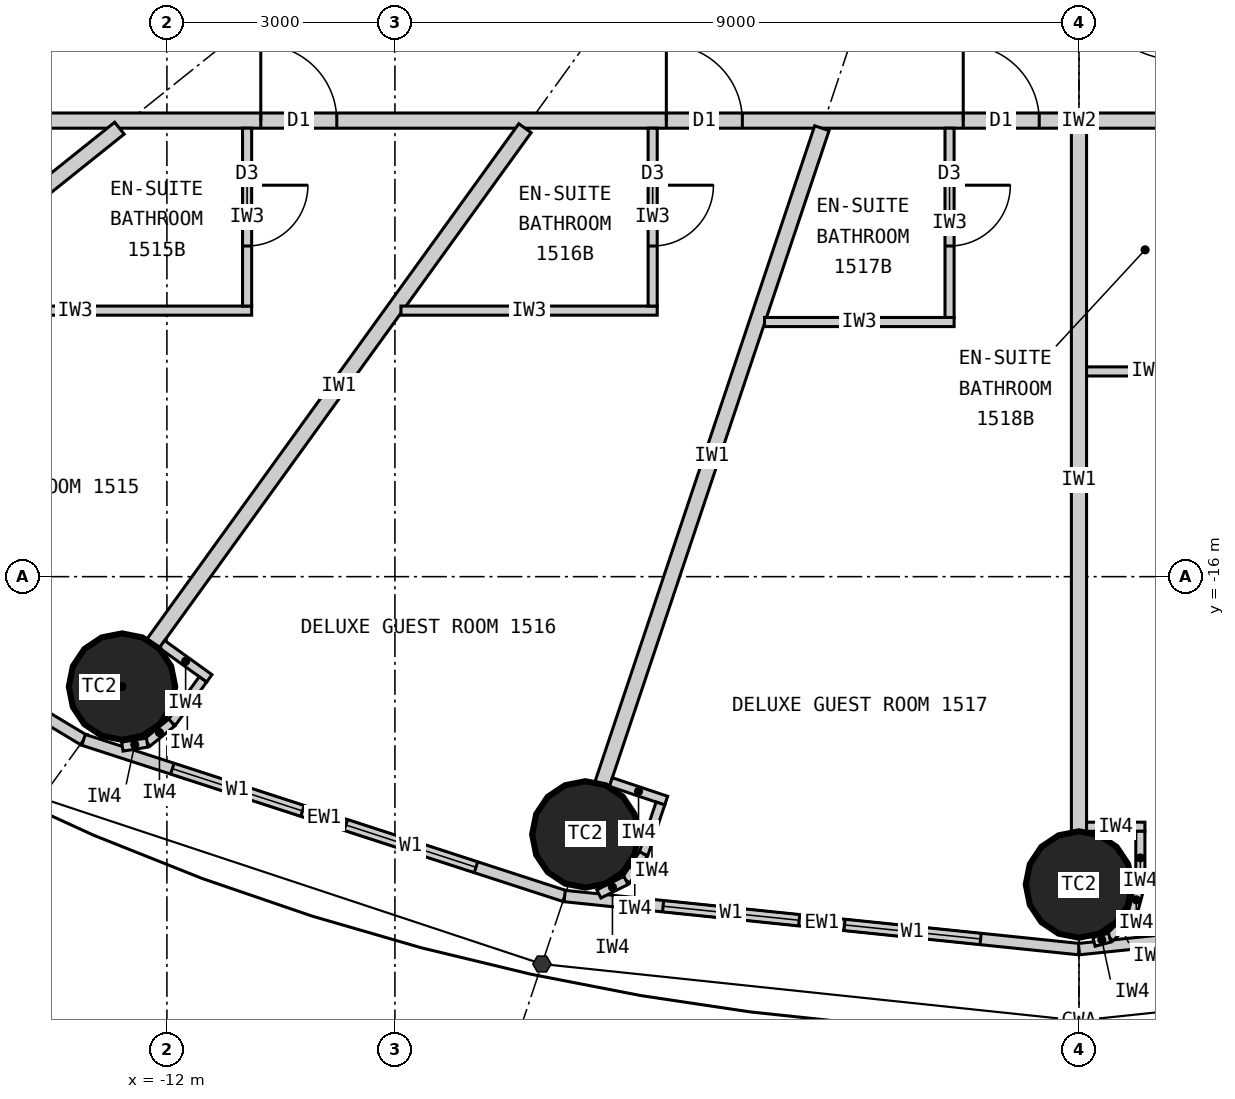
"""IFC4 building model, lengths in metres.
Left out: names, types, materials, properties, quantities, classifications, styles, units other than length and angle.
Written with IfcOpenShell. Run it as: python <this file> out.ifc"""

import sys

from ifc_helpers import new_model, si_unit, direction, frame, frame_2d, origin, origin_2d, place, context, subcontext, project, spatial, rectangle, circle, extrude, element, fill, save


model = new_model("IFC4")
c1 = context("Model", 3, precision=1e-05, world=origin(), true_north=direction((0.0, 1.0)))
c2 = subcontext(c1, "Body", "Model", "MODEL_VIEW")
j1 = project(units=[si_unit("LENGTHUNIT", "METRE"), si_unit("PLANEANGLEUNIT", "RADIAN")], contexts=[c1])
p1 = place(None, origin())
s1 = spatial("IfcSite", under=j1, at=p1, CompositionType="ELEMENT")
p2 = place(p1, origin())
s2 = spatial("IfcBuilding", under=s1, at=p2, CompositionType="ELEMENT")
p3 = place(p2, frame((0.0, 0.0, 63.9)))
s3 = spatial("IfcBuildingStorey", under=s2, at=p3, CompositionType="ELEMENT", Elevation=63.9)
for number, where, z_axis, x_axis in (
    (1, (-12.591, -17.447, 0.0), (0.0, 0.0, 1.0), (1.0, 0.0, 0.0)),
    (2, (-6.495, -19.391, 0.0), (0.0, 0.0, 1.0), (1.0, 0.0, 0.0)),
    (3, (0.0, -20.05, 0.0), (0.0, 0.0, 1.0), (1.0, 0.0, 0.0)),
):
    element("IfcColumn", number, at=place(p3, frame(where, z_axis=z_axis, x_axis=x_axis)), inside=s3, PredefinedType="COLUMN", context=c2, shape_type="SweptSolid", body=[
        extrude(circle(Radius=0.7, at=origin_2d()), origin(), (0.0, 0.0, 1.0), 3.3),
    ])
p4 = place(p3, frame((-18.57, -14.856, 0.0), z_axis=(0.0, 0.0, 1.0), x_axis=(0.856983180864, -0.515344377787, 0.0)))
e4 = element("IfcWall", 4, at=p4, inside=s3, PredefinedType="ELEMENTEDWALL", context=c2, shape_type="SweptSolid", body=[
    extrude(rectangle(XDim=6.386, YDim=0.15, at=frame_2d((3.193, 0.0))), origin(), (0.0, 0.0, 1.0), 3.12),
])
p5 = place(p4, frame((1.093, 0.0, 0.9)))
e5 = element("IfcOpeningElement", 5, at=p5, cuts=e4, PredefinedType="OPENING", context=c2, shape_type="SweptSolid", body=[
    extrude(rectangle(XDim=1.8, YDim=1.9, at=frame_2d((0.9, 0.95))), frame((0.0, 0.085, 0.0), z_axis=(0.0, -1.0, 0.0), x_axis=(1.0, 0.0, 0.0)), (0.0, 0.0, 1.0), 0.17),
])
p6 = place(p4, frame((3.493, 0.0, 0.9)))
e6 = element("IfcOpeningElement", 6, at=p6, cuts=e4, PredefinedType="OPENING", context=c2, shape_type="SweptSolid", body=[
    extrude(rectangle(XDim=1.8, YDim=1.9, at=frame_2d((0.9, 0.95))), frame((0.0, 0.085, 0.0), z_axis=(0.0, -1.0, 0.0), x_axis=(1.0, 0.0, 0.0)), (0.0, 0.0, 1.0), 0.17),
])
p7 = place(p3, frame((-13.096, -18.147, 0.0), z_axis=(0.0, 0.0, 1.0), x_axis=(0.951137534625, -0.308767534285, 0.0)))
e7 = element("IfcWall", 7, at=p7, inside=s3, PredefinedType="ELEMENTEDWALL", context=c2, shape_type="SweptSolid", body=[
    extrude(rectangle(XDim=6.655, YDim=0.15, at=frame_2d((3.328, 0.0))), origin(), (0.0, 0.0, 1.0), 3.12),
])
p8 = place(p7, frame((1.228, 0.0, 0.9)))
e8 = element("IfcOpeningElement", 8, at=p8, cuts=e7, PredefinedType="OPENING", context=c2, shape_type="SweptSolid", body=[
    extrude(rectangle(XDim=1.8, YDim=1.9, at=frame_2d((0.9, 0.95))), frame((0.0, 0.085, 0.0), z_axis=(0.0, -1.0, 0.0), x_axis=(1.0, 0.0, 0.0)), (0.0, 0.0, 1.0), 0.17),
])
p9 = place(p7, frame((3.628, 0.0, 0.9)))
e9 = element("IfcOpeningElement", 9, at=p9, cuts=e7, PredefinedType="OPENING", context=c2, shape_type="SweptSolid", body=[
    extrude(rectangle(XDim=1.8, YDim=1.9, at=frame_2d((0.9, 0.95))), frame((0.0, 0.085, 0.0), z_axis=(0.0, -1.0, 0.0), x_axis=(1.0, 0.0, 0.0)), (0.0, 0.0, 1.0), 0.17),
])
p10 = place(p3, frame((-6.766, -20.202, 0.0), z_axis=(0.0, 0.0, 1.0), x_axis=(0.994721394369, -0.102612609291, 0.0)))
e10 = element("IfcWall", 10, at=p10, inside=s3, PredefinedType="ELEMENTEDWALL", context=c2, shape_type="SweptSolid", body=[
    extrude(rectangle(XDim=6.802, YDim=0.15, at=frame_2d((3.401, 0.0))), origin(), (0.0, 0.0, 1.0), 3.12),
])
p11 = place(p10, frame((1.301, 0.0, 0.9)))
e11 = element("IfcOpeningElement", 11, at=p11, cuts=e10, PredefinedType="OPENING", context=c2, shape_type="SweptSolid", body=[
    extrude(rectangle(XDim=1.8, YDim=1.9, at=frame_2d((0.9, 0.95))), frame((0.0, 0.085, 0.0), z_axis=(0.0, -1.0, 0.0), x_axis=(1.0, 0.0, 0.0)), (0.0, 0.0, 1.0), 0.17),
])
p12 = place(p10, frame((3.701, 0.0, 0.9)))
e12 = element("IfcOpeningElement", 12, at=p12, cuts=e10, PredefinedType="OPENING", context=c2, shape_type="SweptSolid", body=[
    extrude(rectangle(XDim=1.8, YDim=1.9, at=frame_2d((0.9, 0.95))), frame((0.0, 0.085, 0.0), z_axis=(0.0, -1.0, 0.0), x_axis=(1.0, 0.0, 0.0)), (0.0, 0.0, 1.0), 0.17),
])
p13 = place(p3, frame((0.0, -20.9, 0.0), z_axis=(0.0, 0.0, 1.0), x_axis=(0.994721394369, 0.102612609291, 0.0)))
e13 = element("IfcWall", 13, at=p13, inside=s3, PredefinedType="ELEMENTEDWALL", context=c2, shape_type="SweptSolid", body=[
    extrude(rectangle(XDim=6.802, YDim=0.15, at=frame_2d((3.401, 0.0))), origin(), (0.0, 0.0, 1.0), 3.12),
])
p14 = place(p13, frame((1.301, 0.0, 0.9)))
e14 = element("IfcOpeningElement", 14, at=p14, cuts=e13, PredefinedType="OPENING", context=c2, shape_type="SweptSolid", body=[
    extrude(rectangle(XDim=1.8, YDim=1.9, at=frame_2d((0.9, 0.95))), frame((0.0, 0.085, 0.0), z_axis=(0.0, -1.0, 0.0), x_axis=(1.0, 0.0, 0.0)), (0.0, 0.0, 1.0), 0.17),
])
p15 = place(p13, frame((3.701, 0.0, 0.9)))
e15 = element("IfcOpeningElement", 15, at=p15, cuts=e13, PredefinedType="OPENING", context=c2, shape_type="SweptSolid", body=[
    extrude(rectangle(XDim=1.8, YDim=1.9, at=frame_2d((0.9, 0.95))), frame((0.0, 0.085, 0.0), z_axis=(0.0, -1.0, 0.0), x_axis=(1.0, 0.0, 0.0)), (0.0, 0.0, 1.0), 0.17),
])
p16 = place(p3, frame((14.1, -10.0, 0.0), z_axis=(0.0, 0.0, 1.0), x_axis=(-1.0, 0.0, 0.0)))
e16 = element("IfcWall", 16, at=p16, inside=s3, PredefinedType="PARTITIONING", context=c2, shape_type="SweptSolid", body=[
    extrude(rectangle(XDim=28.2, YDim=0.2, at=frame_2d((14.1, 0.0))), origin(), (0.0, 0.0, 1.0), 3.12),
])
p17 = place(p16, frame((23.865, 0.0, 0.0)))
e17 = element("IfcOpeningElement", 17, at=p17, cuts=e16, PredefinedType="OPENING", context=c2, shape_type="SweptSolid", body=[
    extrude(rectangle(XDim=1.0, YDim=2.2, at=frame_2d((0.5, 1.1))), frame((0.0, 0.11, 0.0), z_axis=(0.0, -1.0, 0.0), x_axis=(1.0, 0.0, 0.0)), (0.0, 0.0, 1.0), 0.22),
])
p18 = place(p16, frame((18.529, 0.0, 0.0)))
e18 = element("IfcOpeningElement", 18, at=p18, cuts=e16, PredefinedType="OPENING", context=c2, shape_type="SweptSolid", body=[
    extrude(rectangle(XDim=1.0, YDim=2.2, at=frame_2d((0.5, 1.1))), frame((0.0, 0.11, 0.0), z_axis=(0.0, -1.0, 0.0), x_axis=(1.0, 0.0, 0.0)), (0.0, 0.0, 1.0), 0.22),
])
p19 = place(p16, frame((14.623, 0.0, 0.0)))
e19 = element("IfcOpeningElement", 19, at=p19, cuts=e16, PredefinedType="OPENING", context=c2, shape_type="SweptSolid", body=[
    extrude(rectangle(XDim=1.0, YDim=2.2, at=frame_2d((0.5, 1.1))), frame((0.0, 0.11, 0.0), z_axis=(0.0, -1.0, 0.0), x_axis=(1.0, 0.0, 0.0)), (0.0, 0.0, 1.0), 0.22),
])
p20 = place(p16, frame((11.24, 0.0, 0.0)))
e20 = element("IfcOpeningElement", 20, at=p20, cuts=e16, PredefinedType="OPENING", context=c2, shape_type="SweptSolid", body=[
    extrude(rectangle(XDim=1.0, YDim=2.2, at=frame_2d((0.5, 1.1))), frame((0.0, 0.11, 0.0), z_axis=(0.0, -1.0, 0.0), x_axis=(1.0, 0.0, 0.0)), (0.0, 0.0, 1.0), 0.22),
])
p21 = place(p16, frame((8.671, 0.0, 0.0)))
e21 = element("IfcOpeningElement", 21, at=p21, cuts=e16, PredefinedType="OPENING", context=c2, shape_type="SweptSolid", body=[
    extrude(rectangle(XDim=1.0, YDim=2.2, at=frame_2d((0.5, 1.1))), frame((0.0, 0.11, 0.0), z_axis=(0.0, -1.0, 0.0), x_axis=(1.0, 0.0, 0.0)), (0.0, 0.0, 1.0), 0.22),
])
p22 = place(p16, frame((2.801, 0.0, 0.0)))
e22 = element("IfcOpeningElement", 22, at=p22, cuts=e16, PredefinedType="OPENING", context=c2, shape_type="SweptSolid", body=[
    extrude(rectangle(XDim=1.0, YDim=2.2, at=frame_2d((0.5, 1.1))), frame((0.0, 0.11, 0.0), z_axis=(0.0, -1.0, 0.0), x_axis=(1.0, 0.0, 0.0)), (0.0, 0.0, 1.0), 0.22),
])
p23 = place(p3, frame((-12.625, -10.1, 0.0), z_axis=(0.0, 0.0, 1.0), x_axis=(-0.780892451574, -0.624665493744, 0.0)))
e23 = element("IfcWall", 23, at=p23, inside=s3, PredefinedType="PARTITIONING", context=c2, shape_type="SweptSolid", body=[
    extrude(rectangle(XDim=6.045, YDim=0.2, at=frame_2d((3.022, 0.0))), origin(), (0.0, 0.0, 1.0), 2.32),
])
p24 = place(p3, frame((-7.289, -10.1, 0.0), z_axis=(0.0, 0.0, 1.0), x_axis=(-0.585198353053, -0.810890182197, 0.0)))
e24 = element("IfcWall", 24, at=p24, inside=s3, PredefinedType="PARTITIONING", context=c2, shape_type="SweptSolid", body=[
    extrude(rectangle(XDim=8.36, YDim=0.2, at=frame_2d((4.18, 0.0))), origin(), (0.0, 0.0, 1.0), 2.32),
])
p25 = place(p3, frame((-3.383, -10.1, 0.0), z_axis=(0.0, 0.0, 1.0), x_axis=(-0.31759592231, -0.948226149256, 0.0)))
e25 = element("IfcWall", 25, at=p25, inside=s3, PredefinedType="PARTITIONING", context=c2, shape_type="SweptSolid", body=[
    extrude(rectangle(XDim=9.098, YDim=0.2, at=frame_2d((4.549, 0.0))), origin(), (0.0, 0.0, 1.0), 2.32),
])
p26 = place(p3, frame((0.0, -10.1, 0.0), z_axis=(0.0, 0.0, 1.0), x_axis=(0.0, -1.0, 0.0)))
e26 = element("IfcWall", 26, at=p26, inside=s3, PredefinedType="PARTITIONING", context=c2, shape_type="SweptSolid", body=[
    extrude(rectangle(XDim=9.25, YDim=0.2, at=frame_2d((4.625, 0.0))), origin(), (0.0, 0.0, 1.0), 2.32),
])
p27 = place(p3, frame((-15.525, -12.5, 0.0), z_axis=(0.0, 0.0, 1.0), x_axis=(1.0, 0.0, 0.0)))
e27 = element("IfcWall", 27, at=p27, inside=s3, PredefinedType="PARTITIONING", context=c2, shape_type="SweptSolid", body=[
    extrude(rectangle(XDim=4.64, YDim=0.12, at=frame_2d((2.32, 0.0))), origin(), (0.0, 0.0, 1.0), 3.12),
])
p28 = place(p3, frame((-10.945, -10.1, 0.0), z_axis=(0.0, 0.0, 1.0), x_axis=(0.0, -1.0, 0.0)))
e28 = element("IfcWall", 28, at=p28, inside=s3, PredefinedType="PARTITIONING", context=c2, shape_type="SweptSolid", body=[
    extrude(rectangle(XDim=2.34, YDim=0.12, at=frame_2d((1.17, 0.0))), origin(), (0.0, 0.0, 1.0), 3.12),
])
p29 = place(p28, frame((0.75, 0.0, 0.0)))
e29 = element("IfcOpeningElement", 29, at=p29, cuts=e28, PredefinedType="OPENING", context=c2, shape_type="SweptSolid", body=[
    extrude(rectangle(XDim=0.8, YDim=2.1, at=frame_2d((0.4, 1.05))), frame((0.0, 0.07, 0.0), z_axis=(0.0, -1.0, 0.0), x_axis=(1.0, 0.0, 0.0)), (0.0, 0.0, 1.0), 0.14),
])
p30 = place(p3, frame((-8.921, -12.5, 0.0), z_axis=(0.0, 0.0, 1.0), x_axis=(1.0, 0.0, 0.0)))
e30 = element("IfcWall", 30, at=p30, inside=s3, PredefinedType="PARTITIONING", context=c2, shape_type="SweptSolid", body=[
    extrude(rectangle(XDim=3.372, YDim=0.12, at=frame_2d((1.686, 0.0))), origin(), (0.0, 0.0, 1.0), 3.12),
])
p31 = place(p3, frame((-5.609, -10.1, 0.0), z_axis=(0.0, 0.0, 1.0), x_axis=(0.0, -1.0, 0.0)))
e31 = element("IfcWall", 31, at=p31, inside=s3, PredefinedType="PARTITIONING", context=c2, shape_type="SweptSolid", body=[
    extrude(rectangle(XDim=2.34, YDim=0.12, at=frame_2d((1.17, 0.0))), origin(), (0.0, 0.0, 1.0), 3.12),
])
p32 = place(p31, frame((0.75, 0.0, 0.0)))
e32 = element("IfcOpeningElement", 32, at=p32, cuts=e31, PredefinedType="OPENING", context=c2, shape_type="SweptSolid", body=[
    extrude(rectangle(XDim=0.8, YDim=2.1, at=frame_2d((0.4, 1.05))), frame((0.0, 0.07, 0.0), z_axis=(0.0, -1.0, 0.0), x_axis=(1.0, 0.0, 0.0)), (0.0, 0.0, 1.0), 0.14),
])
p33 = place(p3, frame((-4.137, -12.65, 0.0), z_axis=(0.0, 0.0, 1.0), x_axis=(1.0, 0.0, 0.0)))
e33 = element("IfcWall", 33, at=p33, inside=s3, PredefinedType="PARTITIONING", context=c2, shape_type="SweptSolid", body=[
    extrude(rectangle(XDim=2.494, YDim=0.12, at=frame_2d((1.247, 0.0))), origin(), (0.0, 0.0, 1.0), 3.12),
])
p34 = place(p3, frame((-1.703, -10.1, 0.0), z_axis=(0.0, 0.0, 1.0), x_axis=(0.0, -1.0, 0.0)))
e34 = element("IfcWall", 34, at=p34, inside=s3, PredefinedType="PARTITIONING", context=c2, shape_type="SweptSolid", body=[
    extrude(rectangle(XDim=2.49, YDim=0.12, at=frame_2d((1.245, 0.0))), origin(), (0.0, 0.0, 1.0), 3.12),
])
p35 = place(p34, frame((0.75, 0.0, 0.0)))
e35 = element("IfcOpeningElement", 35, at=p35, cuts=e34, PredefinedType="OPENING", context=c2, shape_type="SweptSolid", body=[
    extrude(rectangle(XDim=0.8, YDim=2.1, at=frame_2d((0.4, 1.05))), frame((0.0, 0.07, 0.0), z_axis=(0.0, -1.0, 0.0), x_axis=(1.0, 0.0, 0.0)), (0.0, 0.0, 1.0), 0.14),
])
p36 = place(p3, frame((0.1, -13.3, 0.0), z_axis=(0.0, 0.0, 1.0), x_axis=(1.0, 0.0, 0.0)))
e36 = element("IfcWall", 36, at=p36, inside=s3, PredefinedType="PARTITIONING", context=c2, shape_type="SweptSolid", body=[
    extrude(rectangle(XDim=1.64, YDim=0.12, at=frame_2d((0.82, 0.0))), origin(), (0.0, 0.0, 1.0), 3.12),
])
p37 = place(p3, frame((-12.065, -16.889, 0.0), z_axis=(0.0, 0.0, 1.0), x_axis=(0.810821798253, -0.585293098778, 0.0)))
e37 = element("IfcWall", 37, at=p37, inside=s3, PredefinedType="PARTITIONING", context=c2, shape_type="SweptSolid", body=[
    extrude(rectangle(XDim=0.768, YDim=0.12, at=frame_2d((0.384, 0.0))), origin(), (0.0, 0.0, 1.0), 3.12),
])
p38 = place(p3, frame((-11.526, -17.351, 0.0), z_axis=(0.0, 0.0, 1.0), x_axis=(-0.585223113993, -0.810872312296, 0.0)))
e38 = element("IfcWall", 38, at=p38, inside=s3, PredefinedType="PARTITIONING", context=c2, shape_type="SweptSolid", body=[
    extrude(rectangle(XDim=0.7, YDim=0.12, at=frame_2d((0.35, 0.0))), origin(), (0.0, 0.0, 1.0), 3.12),
])
p39 = place(p3, frame((-11.936, -17.919, 0.0), z_axis=(0.0, 0.0, 1.0), x_axis=(-0.775023088441, -0.631932917629, 0.0)))
e39 = element("IfcWall", 39, at=p39, inside=s3, PredefinedType="PARTITIONING", context=c2, shape_type="SweptSolid", body=[
    extrude(rectangle(XDim=0.418, YDim=0.12, at=frame_2d((0.209, 0.0))), origin(), (0.0, 0.0, 1.0), 3.12),
])
p40 = place(p3, frame((-12.26, -18.183, 0.0), z_axis=(0.0, 0.0, 1.0), x_axis=(-0.987218661664, -0.159371622511, 0.0)))
e40 = element("IfcWall", 40, at=p40, inside=s3, PredefinedType="PARTITIONING", context=c2, shape_type="SweptSolid", body=[
    extrude(rectangle(XDim=0.331, YDim=0.12, at=frame_2d((0.166, 0.0))), origin(), (0.0, 0.0, 1.0), 3.12),
])
p41 = place(p3, frame((-6.159, -18.702, 0.0), z_axis=(0.0, 0.0, 1.0), x_axis=(0.948173154049, -0.31775410295, 0.0)))
e41 = element("IfcWall", 41, at=p41, inside=s3, PredefinedType="PARTITIONING", context=c2, shape_type="SweptSolid", body=[
    extrude(rectangle(XDim=0.768, YDim=0.12, at=frame_2d((0.384, 0.0))), origin(), (0.0, 0.0, 1.0), 3.12),
])
p42 = place(p3, frame((-5.507, -18.984, 0.0), z_axis=(0.0, 0.0, 1.0), x_axis=(-0.317692050622, -0.948193946918, 0.0)))
e42 = element("IfcWall", 42, at=p42, inside=s3, PredefinedType="PARTITIONING", context=c2, shape_type="SweptSolid", body=[
    extrude(rectangle(XDim=0.7, YDim=0.12, at=frame_2d((0.35, 0.0))), origin(), (0.0, 0.0, 1.0), 3.12),
])
p43 = place(p3, frame((-5.729, -19.648, 0.0), z_axis=(0.0, 0.0, 1.0), x_axis=(-0.552135764955, -0.833754218615, 0.0)))
e43 = element("IfcWall", 43, at=p43, inside=s3, PredefinedType="PARTITIONING", context=c2, shape_type="SweptSolid", body=[
    extrude(rectangle(XDim=0.418, YDim=0.12, at=frame_2d((0.209, 0.0))), origin(), (0.0, 0.0, 1.0), 3.12),
])
p44 = place(p3, frame((-5.96, -19.996, 0.0), z_axis=(0.0, 0.0, 1.0), x_axis=(-0.895160725913, -0.445743507842, 0.0)))
e44 = element("IfcWall", 44, at=p44, inside=s3, PredefinedType="PARTITIONING", context=c2, shape_type="SweptSolid", body=[
    extrude(rectangle(XDim=0.399, YDim=0.12, at=frame_2d((0.199, 0.0))), origin(), (0.0, 0.0, 1.0), 3.12),
])
p45 = place(p3, frame((0.1, -19.29, 0.0), z_axis=(0.0, 0.0, 1.0), x_axis=(1.0, 0.0, 0.0)))
e45 = element("IfcWall", 45, at=p45, inside=s3, PredefinedType="PARTITIONING", context=c2, shape_type="SweptSolid", body=[
    extrude(rectangle(XDim=0.767, YDim=0.12, at=frame_2d((0.384, 0.0))), origin(), (0.0, 0.0, 1.0), 3.12),
])
p46 = place(p3, frame((0.808, -19.35, 0.0), z_axis=(0.0, 0.0, 1.0), x_axis=(0.0, -1.0, 0.0)))
e46 = element("IfcWall", 46, at=p46, inside=s3, PredefinedType="PARTITIONING", context=c2, shape_type="SweptSolid", body=[
    extrude(rectangle(XDim=0.7, YDim=0.12, at=frame_2d((0.35, 0.0))), origin(), (0.0, 0.0, 1.0), 3.12),
])
p47 = place(p3, frame((0.808, -20.05, 0.0), z_axis=(0.0, 0.0, 1.0), x_axis=(-0.2592614205, -0.965807183573, 0.0)))
e47 = element("IfcWall", 47, at=p47, inside=s3, PredefinedType="PARTITIONING", context=c2, shape_type="SweptSolid", body=[
    extrude(rectangle(XDim=0.418, YDim=0.12, at=frame_2d((0.209, 0.0))), origin(), (0.0, 0.0, 1.0), 3.12),
])
p48 = place(p3, frame((0.699, -20.454, 0.0), z_axis=(0.0, 0.0, 1.0), x_axis=(-0.707106781187, -0.707106781187, 0.0)))
e48 = element("IfcWall", 48, at=p48, inside=s3, PredefinedType="PARTITIONING", context=c2, shape_type="SweptSolid", body=[
    extrude(rectangle(XDim=0.418, YDim=0.12, at=frame_2d((0.209, 0.0))), origin(), (0.0, 0.0, 1.0), 3.12),
])
p49 = place(p3, frame((0.404, -20.749, 0.0), z_axis=(0.0, 0.0, 1.0), x_axis=(-0.965759066438, -0.25944060128, 0.0)))
e49 = element("IfcWall", 49, at=p49, inside=s3, PredefinedType="PARTITIONING", context=c2, shape_type="SweptSolid", body=[
    extrude(rectangle(XDim=0.214, YDim=0.12, at=frame_2d((0.107, 0.0))), origin(), (0.0, 0.0, 1.0), 3.12),
])
p50 = place(p8, origin())
e50 = element("IfcWindow", 50, at=p50, inside=s3, PartitioningType="SINGLE_PANEL", PredefinedType="WINDOW", context=c2, shape_type="SweptSolid", body=[
    extrude(rectangle(XDim=1.8, YDim=1.9, at=frame_2d((0.9, 0.95))), frame((0.0, 0.03, 0.0), z_axis=(0.0, -1.0, 0.0), x_axis=(1.0, 0.0, 0.0)), (0.0, 0.0, 1.0), 0.06),
])
fill(e8, e50)
p51 = place(p9, origin())
e51 = element("IfcWindow", 51, at=p51, inside=s3, PartitioningType="SINGLE_PANEL", PredefinedType="WINDOW", context=c2, shape_type="SweptSolid", body=[
    extrude(rectangle(XDim=1.8, YDim=1.9, at=frame_2d((0.9, 0.95))), frame((0.0, 0.03, 0.0), z_axis=(0.0, -1.0, 0.0), x_axis=(1.0, 0.0, 0.0)), (0.0, 0.0, 1.0), 0.06),
])
fill(e9, e51)
p52 = place(p11, origin())
e52 = element("IfcWindow", 52, at=p52, inside=s3, PartitioningType="SINGLE_PANEL", PredefinedType="WINDOW", context=c2, shape_type="SweptSolid", body=[
    extrude(rectangle(XDim=1.8, YDim=1.9, at=frame_2d((0.9, 0.95))), frame((0.0, 0.03, 0.0), z_axis=(0.0, -1.0, 0.0), x_axis=(1.0, 0.0, 0.0)), (0.0, 0.0, 1.0), 0.06),
])
fill(e11, e52)
p53 = place(p12, origin())
e53 = element("IfcWindow", 53, at=p53, inside=s3, PartitioningType="SINGLE_PANEL", PredefinedType="WINDOW", context=c2, shape_type="SweptSolid", body=[
    extrude(rectangle(XDim=1.8, YDim=1.9, at=frame_2d((0.9, 0.95))), frame((0.0, 0.03, 0.0), z_axis=(0.0, -1.0, 0.0), x_axis=(1.0, 0.0, 0.0)), (0.0, 0.0, 1.0), 0.06),
])
fill(e12, e53)
p54 = place(p29, origin())
e54 = element("IfcDoor", 54, at=p54, inside=s3, OperationType="SINGLE_SWING_LEFT", PredefinedType="DOOR", context=c2, shape_type="SweptSolid", body=[
    extrude(rectangle(XDim=0.8, YDim=2.1, at=frame_2d((0.4, 1.05))), frame((0.0, 0.025, 0.0), z_axis=(0.0, -1.0, 0.0), x_axis=(1.0, 0.0, 0.0)), (0.0, 0.0, 1.0), 0.05),
])
fill(e29, e54)
p55 = place(p17, origin())
e55 = element("IfcDoor", 55, at=p55, inside=s3, OperationType="SINGLE_SWING_RIGHT", PredefinedType="DOOR", context=c2, shape_type="SweptSolid", body=[
    extrude(rectangle(XDim=1.0, YDim=2.2, at=frame_2d((0.5, 1.1))), frame((0.0, 0.025, 0.0), z_axis=(0.0, -1.0, 0.0), x_axis=(1.0, 0.0, 0.0)), (0.0, 0.0, 1.0), 0.05),
])
fill(e17, e55)
p56 = place(p32, origin())
e56 = element("IfcDoor", 56, at=p56, inside=s3, OperationType="SINGLE_SWING_LEFT", PredefinedType="DOOR", context=c2, shape_type="SweptSolid", body=[
    extrude(rectangle(XDim=0.8, YDim=2.1, at=frame_2d((0.4, 1.05))), frame((0.0, 0.025, 0.0), z_axis=(0.0, -1.0, 0.0), x_axis=(1.0, 0.0, 0.0)), (0.0, 0.0, 1.0), 0.05),
])
fill(e32, e56)
p57 = place(p18, origin())
e57 = element("IfcDoor", 57, at=p57, inside=s3, OperationType="SINGLE_SWING_RIGHT", PredefinedType="DOOR", context=c2, shape_type="SweptSolid", body=[
    extrude(rectangle(XDim=1.0, YDim=2.2, at=frame_2d((0.5, 1.1))), frame((0.0, 0.025, 0.0), z_axis=(0.0, -1.0, 0.0), x_axis=(1.0, 0.0, 0.0)), (0.0, 0.0, 1.0), 0.05),
])
fill(e18, e57)
p58 = place(p35, origin())
e58 = element("IfcDoor", 58, at=p58, inside=s3, OperationType="SINGLE_SWING_LEFT", PredefinedType="DOOR", context=c2, shape_type="SweptSolid", body=[
    extrude(rectangle(XDim=0.8, YDim=2.1, at=frame_2d((0.4, 1.05))), frame((0.0, 0.025, 0.0), z_axis=(0.0, -1.0, 0.0), x_axis=(1.0, 0.0, 0.0)), (0.0, 0.0, 1.0), 0.05),
])
fill(e35, e58)
p59 = place(p19, origin())
e59 = element("IfcDoor", 59, at=p59, inside=s3, OperationType="SINGLE_SWING_RIGHT", PredefinedType="DOOR", context=c2, shape_type="SweptSolid", body=[
    extrude(rectangle(XDim=1.0, YDim=2.2, at=frame_2d((0.5, 1.1))), frame((0.0, 0.025, 0.0), z_axis=(0.0, -1.0, 0.0), x_axis=(1.0, 0.0, 0.0)), (0.0, 0.0, 1.0), 0.05),
])
fill(e19, e59)
save(model, sys.argv[1])
